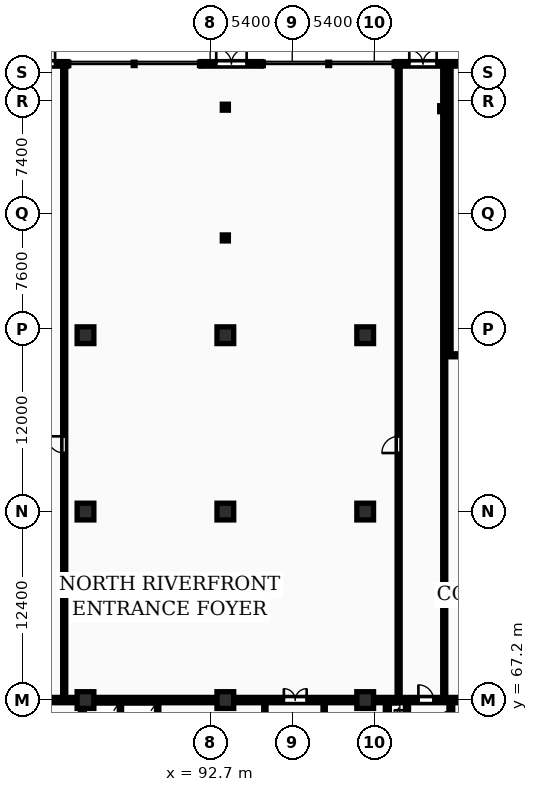
"""IFC4 building model, lengths in metres.
Left out: names, types, materials, properties, quantities, classifications, styles, units other than length and angle.
Written with IfcOpenShell. Run it as: python <this file> out.ifc"""

import sys

from ifc_helpers import new_model, si_unit, direction, frame, frame_2d, origin, origin_2d, place, context, subcontext, project, spatial, rectangle, i_section, extrude, element, fill, save


model = new_model("IFC4")
c1 = context("Model", 3, precision=1e-05, world=origin(), true_north=direction((0.0, 1.0)))
c2 = subcontext(c1, "Body", "Model", "MODEL_VIEW")
j1 = project(units=[si_unit("LENGTHUNIT", "METRE"), si_unit("PLANEANGLEUNIT", "RADIAN")], contexts=[c1])
p1 = place(None, origin())
s1 = spatial("IfcSite", under=j1, at=p1, CompositionType="ELEMENT")
p2 = place(p1, origin())
s2 = spatial("IfcBuilding", under=s1, at=p2, CompositionType="ELEMENT")
p3 = place(p2, origin())
s3 = spatial("IfcBuildingStorey", under=s2, at=p3, CompositionType="ELEMENT", Elevation=0.0)
for number, where, z_axis, x_axis in (
    (1, (84.5, 67.2, 0.0), (0.0, 0.0, 1.0), (1.0, 0.0, 0.0)),
    (2, (84.5, 79.6, 0.0), (0.0, 0.0, 1.0), (1.0, 0.0, 0.0)),
    (3, (84.5, 91.2, 0.0), (0.0, 0.0, 1.0), (1.0, 0.0, 0.0)),
    (4, (93.7, 67.2, 0.0), (0.0, 0.0, 1.0), (1.0, 0.0, 0.0)),
    (5, (93.7, 79.6, 0.0), (0.0, 0.0, 1.0), (1.0, 0.0, 0.0)),
    (6, (93.7, 91.2, 0.0), (0.0, 0.0, 1.0), (1.0, 0.0, 0.0)),
    (7, (102.9, 67.2, 0.0), (0.0, 0.0, 1.0), (1.0, 0.0, 0.0)),
    (8, (102.9, 79.6, 0.0), (0.0, 0.0, 1.0), (1.0, 0.0, 0.0)),
    (9, (102.9, 91.2, 0.0), (0.0, 0.0, 1.0), (1.0, 0.0, 0.0)),
):
    element("IfcColumn", number, at=place(p3, frame(where, z_axis=z_axis, x_axis=x_axis)), inside=s3, PredefinedType="COLUMN", context=c2, shape_type="SweptSolid", body=[
        extrude(rectangle(XDim=1.1, YDim=1.1, at=origin_2d()), origin(), (0.0, 0.0, 1.0), 5.4),
    ])
for number, where, z_axis, x_axis in (
    (10, (93.7, 97.6, 0.0), (0.0, 0.0, 1.0), (1.0, 0.0, 0.0)),
    (11, (108.0, 106.1, 0.0), (0.0, 0.0, 1.0), (1.0, 0.0, 0.0)),
    (12, (93.7, 106.2, 0.0), (0.0, 0.0, 1.0), (1.0, 0.0, 0.0)),
):
    element("IfcColumn", number, at=place(p3, frame(where, z_axis=z_axis, x_axis=x_axis)), inside=s3, PredefinedType="COLUMN", context=c2, shape_type="SweptSolid", body=[
        extrude(i_section(OverallWidth=0.399, OverallDepth=0.394, WebThickness=0.023, FlangeThickness=0.037, FilletRadius=0.015, at=origin_2d()), origin(), (0.0, 0.0, 1.0), 5.4),
    ])
p4 = place(p3, frame((153.5, 109.05, 0.0), z_axis=(0.0, 0.0, 1.0), x_axis=(-1.0, 0.0, 0.0)))
e13 = element("IfcWall", 13, at=p4, inside=s3, PredefinedType="STANDARD", context=c2, shape_type="SweptSolid", body=[
    extrude(rectangle(XDim=48.6, YDim=0.3, at=frame_2d((24.3, 0.0))), origin(), (0.0, 0.0, 1.0), 5.1),
])
p5 = place(p4, frame((45.9, 0.0, 0.0)))
e14 = element("IfcOpeningElement", 14, at=p5, cuts=e13, PredefinedType="OPENING", context=c2, shape_type="SweptSolid", body=[
    extrude(rectangle(XDim=1.8, YDim=2.2, at=frame_2d((0.9, 1.1))), frame((0.0, 0.16, 0.0), z_axis=(0.0, -1.0, 0.0), x_axis=(1.0, 0.0, 0.0)), (0.0, 0.0, 1.0), 0.32),
])
p6 = place(p4, frame((12.0, 0.0, 0.9)))
e15 = element("IfcOpeningElement", 15, at=p6, cuts=e13, PredefinedType="OPENING", context=c2, shape_type="SweptSolid", body=[
    extrude(rectangle(XDim=3.0, YDim=2.6, at=frame_2d((1.5, 1.3))), frame((0.0, 0.16, 0.0), z_axis=(0.0, -1.0, 0.0), x_axis=(1.0, 0.0, 0.0)), (0.0, 0.0, 1.0), 0.32),
])
p7 = place(p3, frame((96.1, 109.05, 0.0), z_axis=(0.0, 0.0, 1.0), x_axis=(-1.0, 0.0, 0.0)))
e16 = element("IfcWall", 16, at=p7, inside=s3, PredefinedType="STANDARD", context=c2, shape_type="SweptSolid", body=[
    extrude(rectangle(XDim=4.0, YDim=0.3, at=frame_2d((2.0, 0.0))), origin(), (0.0, 0.0, 1.0), 5.1),
])
p8 = place(p7, frame((1.0, 0.0, 0.0)))
e17 = element("IfcOpeningElement", 17, at=p8, cuts=e16, PredefinedType="OPENING", context=c2, shape_type="SweptSolid", body=[
    extrude(rectangle(XDim=2.0, YDim=2.6, at=frame_2d((1.0, 1.3))), frame((0.0, 0.16, 0.0), z_axis=(0.0, -1.0, 0.0), x_axis=(1.0, 0.0, 0.0)), (0.0, 0.0, 1.0), 0.32),
])
p9 = place(p3, frame((83.3, 109.05, 0.0), z_axis=(0.0, 0.0, 1.0), x_axis=(-1.0, 0.0, 0.0)))
e18 = element("IfcWall", 18, at=p9, inside=s3, PredefinedType="STANDARD", context=c2, shape_type="SweptSolid", body=[
    extrude(rectangle(XDim=39.8, YDim=0.3, at=frame_2d((19.9, 0.0))), origin(), (0.0, 0.0, 1.0), 5.1),
])
p10 = place(p9, frame((0.8, 0.0, 0.0)))
e19 = element("IfcOpeningElement", 19, at=p10, cuts=e18, PredefinedType="OPENING", context=c2, shape_type="SweptSolid", body=[
    extrude(rectangle(XDim=1.8, YDim=2.2, at=frame_2d((0.9, 1.1))), frame((0.0, 0.16, 0.0), z_axis=(0.0, -1.0, 0.0), x_axis=(1.0, 0.0, 0.0)), (0.0, 0.0, 1.0), 0.32),
])
p11 = place(p9, frame((6.2, 0.0, 0.0)))
e20 = element("IfcOpeningElement", 20, at=p11, cuts=e18, PredefinedType="OPENING", context=c2, shape_type="SweptSolid", body=[
    extrude(rectangle(XDim=1.8, YDim=2.2, at=frame_2d((0.9, 1.1))), frame((0.0, 0.16, 0.0), z_axis=(0.0, -1.0, 0.0), x_axis=(1.0, 0.0, 0.0)), (0.0, 0.0, 1.0), 0.32),
])
p12 = place(p9, frame((20.0, 0.0, 0.0)))
e21 = element("IfcOpeningElement", 21, at=p12, cuts=e18, PredefinedType="OPENING", context=c2, shape_type="SweptSolid", body=[
    extrude(rectangle(XDim=2.0, YDim=2.6, at=frame_2d((1.0, 1.3))), frame((0.0, 0.16, 0.0), z_axis=(0.0, -1.0, 0.0), x_axis=(1.0, 0.0, 0.0)), (0.0, 0.0, 1.0), 0.32),
])
p13 = place(p3, frame((75.95, 67.2, 0.0), z_axis=(0.0, 0.0, 1.0), x_axis=(1.0, 0.0, 0.0)))
e22 = element("IfcWall", 22, at=p13, inside=s3, PredefinedType="SHEAR", context=c2, shape_type="SweptSolid", body=[
    extrude(rectangle(XDim=36.3, YDim=0.35, at=frame_2d((18.15, 0.0))), origin(), (0.0, 0.0, 1.0), 5.4),
])
p14 = place(p13, frame((5.25, 0.0, 0.0)))
e23 = element("IfcOpeningElement", 23, at=p14, cuts=e22, PredefinedType="OPENING", context=c2, shape_type="SweptSolid", body=[
    extrude(rectangle(XDim=1.0, YDim=2.15, at=frame_2d((0.5, 1.075))), frame((0.0, 0.185, 0.0), z_axis=(0.0, -1.0, 0.0), x_axis=(1.0, 0.0, 0.0)), (0.0, 0.0, 1.0), 0.37),
])
p15 = place(p13, frame((21.6, 0.0, 0.0)))
e24 = element("IfcOpeningElement", 24, at=p15, cuts=e22, PredefinedType="OPENING", context=c2, shape_type="SweptSolid", body=[
    extrude(rectangle(XDim=1.5, YDim=2.2, at=frame_2d((0.75, 1.1))), frame((0.0, 0.185, 0.0), z_axis=(0.0, -1.0, 0.0), x_axis=(1.0, 0.0, 0.0)), (0.0, 0.0, 1.0), 0.37),
])
p16 = place(p13, frame((30.45, 0.0, 0.0)))
e25 = element("IfcOpeningElement", 25, at=p16, cuts=e22, PredefinedType="OPENING", context=c2, shape_type="SweptSolid", body=[
    extrude(rectangle(XDim=1.0, YDim=2.15, at=frame_2d((0.5, 1.075))), frame((0.0, 0.185, 0.0), z_axis=(0.0, -1.0, 0.0), x_axis=(1.0, 0.0, 0.0)), (0.0, 0.0, 1.0), 0.37),
])
p17 = place(p3, frame((84.3, 55.4, 0.0), z_axis=(0.0, 0.0, 1.0), x_axis=(0.0, 1.0, 0.0)))
e26 = element("IfcWall", 26, at=p17, inside=s3, PredefinedType="SHEAR", context=c2, shape_type="SweptSolid", body=[
    extrude(rectangle(XDim=11.6, YDim=0.25, at=frame_2d((5.8, 0.0))), origin(), (0.0, 0.0, 1.0), 5.4),
])
p18 = place(p17, frame((5.2, 0.0, 0.0)))
e27 = element("IfcOpeningElement", 27, at=p18, cuts=e26, PredefinedType="OPENING", context=c2, shape_type="SweptSolid", body=[
    extrude(rectangle(XDim=1.1, YDim=2.1, at=frame_2d((0.55, 1.05))), frame((0.0, 0.135, 0.0), z_axis=(0.0, -1.0, 0.0), x_axis=(1.0, 0.0, 0.0)), (0.0, 0.0, 1.0), 0.27),
])
for number, where, z_axis, x_axis in (
    (28, (86.8, 63.4, 0.0), (0.0, 0.0, 1.0), (0.0, 1.0, 0.0)),
    (29, (89.25, 63.4, 0.0), (0.0, 0.0, 1.0), (0.0, 1.0, 0.0)),
    (30, (96.3, 63.4, 0.0), (0.0, 0.0, 1.0), (0.0, 1.0, 0.0)),
    (31, (100.2, 63.4, 0.0), (0.0, 0.0, 1.0), (0.0, 1.0, 0.0)),
):
    element("IfcWall", number, at=place(p3, frame(where, z_axis=z_axis, x_axis=x_axis)), inside=s3, PredefinedType="PARTITIONING", context=c2, shape_type="SweptSolid", body=[
        extrude(rectangle(XDim=3.6, YDim=0.15, at=frame_2d((1.8, 0.0))), origin(), (0.0, 0.0, 1.0), 5.1),
    ])
p19 = place(p3, frame((105.65, 65.28, 0.0), z_axis=(0.0, 0.0, 1.0), x_axis=(0.0, 1.0, 0.0)))
e32 = element("IfcWall", 32, at=p19, inside=s3, PredefinedType="PARTITIONING", context=c2, shape_type="SweptSolid", body=[
    extrude(rectangle(XDim=1.72, YDim=0.2, at=frame_2d((0.86, 0.0))), origin(), (0.0, 0.0, 1.0), 5.1),
])
p20 = place(p19, frame((0.4, 0.0, 0.0)))
e33 = element("IfcOpeningElement", 33, at=p20, cuts=e32, PredefinedType="OPENING", context=c2, shape_type="SweptSolid", body=[
    extrude(rectangle(XDim=0.85, YDim=2.05, at=frame_2d((0.425, 1.025))), frame((0.0, 0.11, 0.0), z_axis=(0.0, -1.0, 0.0), x_axis=(1.0, 0.0, 0.0)), (0.0, 0.0, 1.0), 0.22),
])
p21 = place(p3, frame((104.35, 58.4, 0.0), z_axis=(0.0, 0.0, 1.0), x_axis=(0.0, 1.0, 0.0)))
e34 = element("IfcWall", 34, at=p21, inside=s3, PredefinedType="SHEAR", context=c2, shape_type="SweptSolid", body=[
    extrude(rectangle(XDim=8.6, YDim=0.25, at=frame_2d((4.3, 0.0))), origin(), (0.0, 0.0, 1.0), 5.4),
])
p22 = place(p21, frame((1.8, 0.0, 0.0)))
e35 = element("IfcOpeningElement", 35, at=p22, cuts=e34, PredefinedType="OPENING", context=c2, shape_type="SweptSolid", body=[
    extrude(rectangle(XDim=1.1, YDim=2.1, at=frame_2d((0.55, 1.05))), frame((0.0, 0.135, 0.0), z_axis=(0.0, -1.0, 0.0), x_axis=(1.0, 0.0, 0.0)), (0.0, 0.0, 1.0), 0.27),
])
p23 = place(p3, frame((108.535, 55.4, 0.0), z_axis=(0.0, 0.0, 1.0), x_axis=(0.0, 1.0, 0.0)))
e36 = element("IfcWall", 36, at=p23, inside=s3, PredefinedType="SHEAR", context=c2, shape_type="SweptSolid", body=[
    extrude(rectangle(XDim=11.6, YDim=0.25, at=frame_2d((5.8, 0.0))), origin(), (0.0, 0.0, 1.0), 5.4),
])
p24 = place(p23, frame((8.2, 0.0, 0.0)))
e37 = element("IfcOpeningElement", 37, at=p24, cuts=e36, PredefinedType="OPENING", context=c2, shape_type="SweptSolid", body=[
    extrude(rectangle(XDim=1.1, YDim=2.1, at=frame_2d((0.55, 1.05))), frame((0.0, 0.135, 0.0), z_axis=(0.0, -1.0, 0.0), x_axis=(1.0, 0.0, 0.0)), (0.0, 0.0, 1.0), 0.27),
])
p25 = place(p23, frame((10.25, 0.0, 0.0)))
e38 = element("IfcOpeningElement", 38, at=p25, cuts=e36, PredefinedType="OPENING", context=c2, shape_type="SweptSolid", body=[
    extrude(rectangle(XDim=0.85, YDim=2.05, at=frame_2d((0.425, 1.025))), frame((0.0, 0.135, 0.0), z_axis=(0.0, -1.0, 0.0), x_axis=(1.0, 0.0, 0.0)), (0.0, 0.0, 1.0), 0.27),
])
p26 = place(p3, frame((83.1, 67.45, 0.0), z_axis=(0.0, 0.0, 1.0), x_axis=(0.0, 1.0, 0.0)))
e39 = element("IfcWall", 39, at=p26, inside=s3, PredefinedType="PARTITIONING", context=c2, shape_type="SweptSolid", body=[
    extrude(rectangle(XDim=41.45, YDim=0.2, at=frame_2d((20.725, 0.0))), origin(), (0.0, 0.0, 1.0), 5.1),
])
p27 = place(p26, frame((16.0, 0.0, 0.0)))
e40 = element("IfcOpeningElement", 40, at=p27, cuts=e39, PredefinedType="OPENING", context=c2, shape_type="SweptSolid", body=[
    extrude(rectangle(XDim=1.1, YDim=2.1, at=frame_2d((0.55, 1.05))), frame((0.0, 0.11, 0.0), z_axis=(0.0, -1.0, 0.0), x_axis=(1.0, 0.0, 0.0)), (0.0, 0.0, 1.0), 0.22),
])
p28 = place(p3, frame((105.1, 67.45, 0.0), z_axis=(0.0, 0.0, 1.0), x_axis=(0.0, 1.0, 0.0)))
e41 = element("IfcWall", 41, at=p28, inside=s3, PredefinedType="PARTITIONING", context=c2, shape_type="SweptSolid", body=[
    extrude(rectangle(XDim=41.45, YDim=0.2, at=frame_2d((20.725, 0.0))), origin(), (0.0, 0.0, 1.0), 5.1),
])
p29 = place(p28, frame((16.0, 0.0, 0.0)))
e42 = element("IfcOpeningElement", 42, at=p29, cuts=e41, PredefinedType="OPENING", context=c2, shape_type="SweptSolid", body=[
    extrude(rectangle(XDim=1.1, YDim=2.1, at=frame_2d((0.55, 1.05))), frame((0.0, 0.11, 0.0), z_axis=(0.0, -1.0, 0.0), x_axis=(1.0, 0.0, 0.0)), (0.0, 0.0, 1.0), 0.22),
])
p30 = place(p3, frame((108.1, 67.45, 0.0), z_axis=(0.0, 0.0, 1.0), x_axis=(0.0, 1.0, 0.0)))
e43 = element("IfcWall", 43, at=p30, inside=s3, PredefinedType="PARTITIONING", context=c2, shape_type="SweptSolid", body=[
    extrude(rectangle(XDim=41.45, YDim=0.2, at=frame_2d((20.725, 0.0))), origin(), (0.0, 0.0, 1.0), 5.1),
])
p31 = place(p3, frame((108.45, 89.88, 0.0), z_axis=(0.0, 0.0, 1.0), x_axis=(1.0, 0.0, 0.0)))
e44 = element("IfcWall", 44, at=p31, inside=s3, PredefinedType="PARTITIONING", context=c2, shape_type="SweptSolid", body=[
    extrude(rectangle(XDim=22.25, YDim=0.2, at=frame_2d((11.125, 0.0))), origin(), (0.0, 0.0, 1.0), 5.1),
])
p32 = place(p31, frame((8.0, 0.0, 0.0)))
e45 = element("IfcOpeningElement", 45, at=p32, cuts=e44, PredefinedType="OPENING", context=c2, shape_type="SweptSolid", body=[
    extrude(rectangle(XDim=1.22, YDim=2.18, at=frame_2d((0.61, 1.09))), frame((0.0, 0.11, 0.0), z_axis=(0.0, -1.0, 0.0), x_axis=(1.0, 0.0, 0.0)), (0.0, 0.0, 1.0), 0.22),
])
p33 = place(p3, frame((108.45, 89.88, 0.0), z_axis=(0.0, 0.0, 1.0), x_axis=(0.0, 1.0, 0.0)))
e46 = element("IfcWall", 46, at=p33, inside=s3, PredefinedType="PARTITIONING", context=c2, shape_type="SweptSolid", body=[
    extrude(rectangle(XDim=19.07, YDim=0.2, at=frame_2d((9.535, 0.0))), origin(), (0.0, 0.0, 1.0), 5.1),
])
p34 = place(p5, frame((1.8, 0.0, 0.0), z_axis=(0.0, 0.0, 1.0), x_axis=(-1.0, 0.0, 0.0)))
e47 = element("IfcDoor", 47, at=p34, inside=s3, OperationType="DOUBLE_DOOR_SINGLE_SWING", PredefinedType="DOOR", context=c2, shape_type="SweptSolid", body=[
    extrude(rectangle(XDim=1.8, YDim=2.2, at=frame_2d((0.9, 1.1))), frame((0.0, 0.025, 0.0), z_axis=(0.0, -1.0, 0.0), x_axis=(1.0, 0.0, 0.0)), (0.0, 0.0, 1.0), 0.05),
])
fill(e14, e47)
p35 = place(p8, frame((2.0, 0.0, 0.0), z_axis=(0.0, 0.0, 1.0), x_axis=(-1.0, 0.0, 0.0)))
e48 = element("IfcDoor", 48, at=p35, inside=s3, OperationType="DOUBLE_DOOR_SINGLE_SWING", PredefinedType="DOOR", context=c2, shape_type="SweptSolid", body=[
    extrude(rectangle(XDim=2.0, YDim=2.6, at=frame_2d((1.0, 1.3))), frame((0.0, 0.025, 0.0), z_axis=(0.0, -1.0, 0.0), x_axis=(1.0, 0.0, 0.0)), (0.0, 0.0, 1.0), 0.05),
])
fill(e17, e48)
p36 = place(p10, frame((1.8, 0.0, 0.0), z_axis=(0.0, 0.0, 1.0), x_axis=(-1.0, 0.0, 0.0)))
e49 = element("IfcDoor", 49, at=p36, inside=s3, OperationType="DOUBLE_DOOR_SINGLE_SWING", PredefinedType="DOOR", context=c2, shape_type="SweptSolid", body=[
    extrude(rectangle(XDim=1.8, YDim=2.2, at=frame_2d((0.9, 1.1))), frame((0.0, 0.025, 0.0), z_axis=(0.0, -1.0, 0.0), x_axis=(1.0, 0.0, 0.0)), (0.0, 0.0, 1.0), 0.05),
])
fill(e19, e49)
p37 = place(p15, origin())
e50 = element("IfcDoor", 50, at=p37, inside=s3, OperationType="DOUBLE_DOOR_SINGLE_SWING", PredefinedType="DOOR", context=c2, shape_type="SweptSolid", body=[
    extrude(rectangle(XDim=1.5, YDim=2.2, at=frame_2d((0.75, 1.1))), frame((0.0, 0.025, 0.0), z_axis=(0.0, -1.0, 0.0), x_axis=(1.0, 0.0, 0.0)), (0.0, 0.0, 1.0), 0.05),
])
fill(e24, e50)
p38 = place(p16, origin())
e51 = element("IfcDoor", 51, at=p38, inside=s3, OperationType="SINGLE_SWING_LEFT", PredefinedType="DOOR", context=c2, shape_type="SweptSolid", body=[
    extrude(rectangle(XDim=1.0, YDim=2.15, at=frame_2d((0.5, 1.075))), frame((0.0, 0.025, 0.0), z_axis=(0.0, -1.0, 0.0), x_axis=(1.0, 0.0, 0.0)), (0.0, 0.0, 1.0), 0.05),
])
fill(e25, e51)
p39 = place(p20, origin())
e52 = element("IfcDoor", 52, at=p39, inside=s3, OperationType="SINGLE_SWING_RIGHT", PredefinedType="DOOR", context=c2, shape_type="SweptSolid", body=[
    extrude(rectangle(XDim=0.85, YDim=2.05, at=frame_2d((0.425, 1.025))), frame((0.0, 0.025, 0.0), z_axis=(0.0, -1.0, 0.0), x_axis=(1.0, 0.0, 0.0)), (0.0, 0.0, 1.0), 0.05),
])
fill(e33, e52)
p40 = place(p25, origin())
e53 = element("IfcDoor", 53, at=p40, inside=s3, OperationType="SINGLE_SWING_LEFT", PredefinedType="DOOR", context=c2, shape_type="SweptSolid", body=[
    extrude(rectangle(XDim=0.85, YDim=2.05, at=frame_2d((0.425, 1.025))), frame((0.0, 0.025, 0.0), z_axis=(0.0, -1.0, 0.0), x_axis=(1.0, 0.0, 0.0)), (0.0, 0.0, 1.0), 0.05),
])
fill(e38, e53)
p41 = place(p27, origin())
e54 = element("IfcDoor", 54, at=p41, inside=s3, OperationType="SINGLE_SWING_RIGHT", PredefinedType="DOOR", context=c2, shape_type="SweptSolid", body=[
    extrude(rectangle(XDim=1.1, YDim=2.1, at=frame_2d((0.55, 1.05))), frame((0.0, 0.025, 0.0), z_axis=(0.0, -1.0, 0.0), x_axis=(1.0, 0.0, 0.0)), (0.0, 0.0, 1.0), 0.05),
])
fill(e40, e54)
p42 = place(p29, origin())
e55 = element("IfcDoor", 55, at=p42, inside=s3, OperationType="SINGLE_SWING_LEFT", PredefinedType="DOOR", context=c2, shape_type="SweptSolid", body=[
    extrude(rectangle(XDim=1.1, YDim=2.1, at=frame_2d((0.55, 1.05))), frame((0.0, 0.025, 0.0), z_axis=(0.0, -1.0, 0.0), x_axis=(1.0, 0.0, 0.0)), (0.0, 0.0, 1.0), 0.05),
])
fill(e42, e55)
save(model, sys.argv[1])
